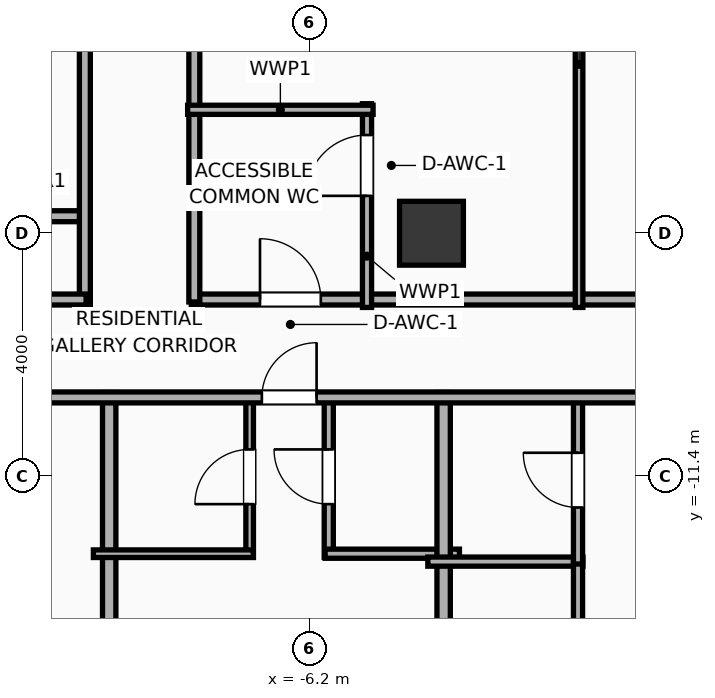
"""IFC4 building model, lengths in metres.
Left out: names, types, materials, properties, quantities, classifications, styles, units other than length and angle.
Written with IfcOpenShell. Run it as: python <this file> out.ifc"""

import sys

from ifc_helpers import new_model, si_unit, direction, frame, frame_2d, origin, origin_2d, place, context, subcontext, project, spatial, rectangle, extrude, element, fill, save


model = new_model("IFC4")
c1 = context("Model", 3, precision=1e-05, world=origin(), true_north=direction((0.0, 1.0)))
c2 = subcontext(c1, "Body", "Model", "MODEL_VIEW")
j1 = project(units=[si_unit("LENGTHUNIT", "METRE"), si_unit("PLANEANGLEUNIT", "RADIAN")], contexts=[c1])
p1 = place(None, origin())
s1 = spatial("IfcSite", under=j1, at=p1, CompositionType="ELEMENT")
p2 = place(p1, origin())
s2 = spatial("IfcBuilding", under=s1, at=p2, CompositionType="ELEMENT")
p3 = place(p2, frame((0.0, 0.0, 68.9)))
s3 = spatial("IfcBuildingStorey", under=s2, at=p3, CompositionType="ELEMENT", Elevation=68.9)
p4 = place(p3, frame((-4.2, -7.4, 0.0), z_axis=(0.0, 0.0, 1.0), x_axis=(1.0, 0.0, 0.0)))
e1 = element("IfcColumn", 1, at=p4, inside=s3, PredefinedType="COLUMN", context=c2, shape_type="SweptSolid", body=[
    extrude(rectangle(XDim=1.05, YDim=1.05, at=origin_2d()), origin(), (0.0, 0.0, 1.0), 3.9),
])
p5 = place(p3, frame((-12.15, -7.12, 0.0), z_axis=(0.0, 0.0, 1.0), x_axis=(1.0, 0.0, 0.0)))
e2 = element("IfcWall", 2, at=p5, inside=s3, PredefinedType="PARTITIONING", context=c2, shape_type="SweptSolid", body=[
    extrude(rectangle(XDim=2.27, YDim=0.18, at=frame_2d((1.135, 0.0))), origin(), (0.0, 0.0, 1.0), 2.94),
])
p6 = place(p3, frame((-9.9, -8.58, 0.0), z_axis=(0.0, 0.0, 1.0), x_axis=(0.0, 1.0, 0.0)))
e3 = element("IfcWall", 3, at=p6, inside=s3, PredefinedType="PARTITIONING", context=c2, shape_type="SweptSolid", body=[
    extrude(rectangle(XDim=17.16, YDim=0.18, at=frame_2d((8.58, 0.0))), origin(), (0.0, 0.0, 1.0), 3.65),
])
p7 = place(p6, frame((7.172, 0.0, 0.0)))
e4 = element("IfcOpeningElement", 4, at=p7, cuts=e3, PredefinedType="OPENING", context=c2, shape_type="SweptSolid", body=[
    extrude(rectangle(XDim=1.1, YDim=2.05, at=frame_2d((0.55, 1.025))), frame((0.0, 0.1, 0.0), z_axis=(0.0, -1.0, 0.0), x_axis=(1.0, 0.0, 0.0)), (0.0, 0.0, 1.0), 0.2),
])
p8 = place(p3, frame((-33.41, -8.49, 0.0), z_axis=(0.0, 0.0, 1.0), x_axis=(1.0, 0.0, 0.0)))
e5 = element("IfcWall", 5, at=p8, inside=s3, PredefinedType="PARTITIONING", context=c2, shape_type="SweptSolid", body=[
    extrude(rectangle(XDim=23.53, YDim=0.18, at=frame_2d((11.765, 0.0))), origin(), (0.0, 0.0, 1.0), 3.65),
])
p9 = place(p3, frame((-8.15, -8.49, 0.0), z_axis=(0.0, 0.0, 1.0), x_axis=(1.0, 0.0, 0.0)))
e6 = element("IfcWall", 6, at=p9, inside=s3, PredefinedType="PARTITIONING", context=c2, shape_type="SweptSolid", body=[
    extrude(rectangle(XDim=16.3, YDim=0.18, at=frame_2d((8.15, 0.0))), origin(), (0.0, 0.0, 1.0), 3.65),
])
p10 = place(p9, frame((1.13, 0.0, 0.0)))
e7 = element("IfcOpeningElement", 7, at=p10, cuts=e6, PredefinedType="OPENING", context=c2, shape_type="SweptSolid", body=[
    extrude(rectangle(XDim=1.0, YDim=2.05, at=frame_2d((0.5, 1.025))), frame((0.0, 0.1, 0.0), z_axis=(0.0, -1.0, 0.0), x_axis=(1.0, 0.0, 0.0)), (0.0, 0.0, 1.0), 0.2),
])
p11 = place(p9, frame((10.12, 0.0, 0.0)))
e8 = element("IfcOpeningElement", 8, at=p11, cuts=e6, PredefinedType="OPENING", context=c2, shape_type="SweptSolid", body=[
    extrude(rectangle(XDim=0.95, YDim=2.05, at=frame_2d((0.475, 1.025))), frame((0.0, 0.1, 0.0), z_axis=(0.0, -1.0, 0.0), x_axis=(1.0, 0.0, 0.0)), (0.0, 0.0, 1.0), 0.2),
])
p12 = place(p3, frame((-8.1, -8.53, 0.0), z_axis=(0.0, 0.0, 1.0), x_axis=(0.0, 1.0, 0.0)))
e9 = element("IfcWall", 9, at=p12, inside=s3, PredefinedType="PARTITIONING", context=c2, shape_type="SweptSolid", body=[
    extrude(rectangle(XDim=17.06, YDim=0.18, at=frame_2d((8.53, 0.0))), origin(), (0.0, 0.0, 1.0), 3.65),
])
p13 = place(p3, frame((-5.26, -8.62, 0.0), z_axis=(0.0, 0.0, 1.0), x_axis=(0.0, 1.0, 0.0)))
e10 = element("IfcWall", 10, at=p13, inside=s3, PredefinedType="PLUMBINGWALL", context=c2, shape_type="SweptSolid", body=[
    extrude(rectangle(XDim=3.35, YDim=0.15, at=frame_2d((1.675, 0.0))), origin(), (0.0, 0.0, 1.0), 3.65),
])
p14 = place(p13, frame((1.835, 0.0, 0.0)))
e11 = element("IfcOpeningElement", 11, at=p14, cuts=e10, PredefinedType="OPENING", context=c2, shape_type="SweptSolid", body=[
    extrude(rectangle(XDim=1.0, YDim=2.05, at=frame_2d((0.5, 1.025))), frame((0.0, 0.085, 0.0), z_axis=(0.0, -1.0, 0.0), x_axis=(1.0, 0.0, 0.0)), (0.0, 0.0, 1.0), 0.17),
])
p15 = place(p3, frame((-8.21, -5.37, 0.0), z_axis=(0.0, 0.0, 1.0), x_axis=(1.0, 0.0, 0.0)))
e12 = element("IfcWall", 12, at=p15, inside=s3, PredefinedType="PLUMBINGWALL", context=c2, shape_type="SweptSolid", body=[
    extrude(rectangle(XDim=3.05, YDim=0.15, at=frame_2d((1.525, 0.0))), origin(), (0.0, 0.0, 1.0), 3.65),
])
p16 = place(p3, frame((-1.773, -8.62, 0.0), z_axis=(0.0, 0.0, 1.0), x_axis=(0.0, 1.0, 0.0)))
e13 = element("IfcWall", 13, at=p16, inside=s3, PredefinedType="PARTITIONING", context=c2, shape_type="SweptSolid", body=[
    extrude(rectangle(XDim=17.24, YDim=0.125, at=frame_2d((8.62, 0.0))), origin(), (0.0, 0.0, 1.0), 3.65),
])
p17 = place(p16, frame((8.145, 0.0, 0.0)))
e14 = element("IfcOpeningElement", 14, at=p17, cuts=e13, PredefinedType="OPENING", context=c2, shape_type="SweptSolid", body=[
    extrude(rectangle(XDim=0.95, YDim=2.05, at=frame_2d((0.475, 1.025))), frame((0.0, 0.073, 0.0), z_axis=(0.0, -1.0, 0.0), x_axis=(1.0, 0.0, 0.0)), (0.0, 0.0, 1.0), 0.145),
])
p18 = place(p3, frame((-9.5, -22.21, 0.0), z_axis=(0.0, 0.0, 1.0), x_axis=(0.0, 1.0, 0.0)))
e15 = element("IfcWall", 15, at=p18, inside=s3, PredefinedType="PARTITIONING", context=c2, shape_type="SweptSolid", body=[
    extrude(rectangle(XDim=12.19, YDim=0.22, at=frame_2d((6.095, 0.0))), origin(), (0.0, 0.0, 1.0), 2.94),
])
p19 = place(p3, frame((-7.19, -12.73, 0.0), z_axis=(0.0, 0.0, 1.0), x_axis=(0.0, 1.0, 0.0)))
e16 = element("IfcWall", 16, at=p19, inside=s3, PredefinedType="PARTITIONING", context=c2, shape_type="SweptSolid", body=[
    extrude(rectangle(XDim=2.65, YDim=0.125, at=frame_2d((1.325, 0.0))), origin(), (0.0, 0.0, 1.0), 3.65),
])
p20 = place(p19, frame((0.875, 0.0, 0.0)))
e17 = element("IfcOpeningElement", 17, at=p20, cuts=e16, PredefinedType="OPENING", context=c2, shape_type="SweptSolid", body=[
    extrude(rectangle(XDim=0.9, YDim=2.05, at=frame_2d((0.45, 1.025))), frame((0.0, 0.073, 0.0), z_axis=(0.0, -1.0, 0.0), x_axis=(1.0, 0.0, 0.0)), (0.0, 0.0, 1.0), 0.145),
])
p21 = place(p3, frame((-5.889, -12.73, 0.0), z_axis=(0.0, 0.0, 1.0), x_axis=(0.0, 1.0, 0.0)))
e18 = element("IfcWall", 18, at=p21, inside=s3, PredefinedType="PLUMBINGWALL", context=c2, shape_type="SweptSolid", body=[
    extrude(rectangle(XDim=2.65, YDim=0.15, at=frame_2d((1.325, 0.0))), origin(), (0.0, 0.0, 1.0), 3.65),
])
p22 = place(p21, frame((0.875, 0.0, 0.0)))
e19 = element("IfcOpeningElement", 19, at=p22, cuts=e18, PredefinedType="OPENING", context=c2, shape_type="SweptSolid", body=[
    extrude(rectangle(XDim=0.9, YDim=2.05, at=frame_2d((0.45, 1.025))), frame((0.0, 0.085, 0.0), z_axis=(0.0, -1.0, 0.0), x_axis=(1.0, 0.0, 0.0)), (0.0, 0.0, 1.0), 0.17),
])
p23 = place(p3, frame((-9.76, -12.67, 0.0), z_axis=(0.0, 0.0, 1.0), x_axis=(1.0, 0.0, 0.0)))
e20 = element("IfcWall", 20, at=p23, inside=s3, PredefinedType="PARTITIONING", context=c2, shape_type="SweptSolid", body=[
    extrude(rectangle(XDim=2.63, YDim=0.125, at=frame_2d((1.315, 0.0))), origin(), (0.0, 0.0, 1.0), 3.65),
])
p24 = place(p3, frame((-5.949, -12.67, 0.0), z_axis=(0.0, 0.0, 1.0), x_axis=(1.0, 0.0, 0.0)))
e21 = element("IfcWall", 21, at=p24, inside=s3, PredefinedType="PLUMBINGWALL", context=c2, shape_type="SweptSolid", body=[
    extrude(rectangle(XDim=2.209, YDim=0.15, at=frame_2d((1.104, 0.0))), origin(), (0.0, 0.0, 1.0), 3.65),
])
p25 = place(p3, frame((-4.0, -22.21, 0.0), z_axis=(0.0, 0.0, 1.0), x_axis=(0.0, 1.0, 0.0)))
e22 = element("IfcWall", 22, at=p25, inside=s3, PredefinedType="PARTITIONING", context=c2, shape_type="SweptSolid", body=[
    extrude(rectangle(XDim=12.19, YDim=0.22, at=frame_2d((6.095, 0.0))), origin(), (0.0, 0.0, 1.0), 3.65),
])
p26 = place(p3, frame((-4.26, -12.8, 0.0), z_axis=(0.0, 0.0, 1.0), x_axis=(1.0, 0.0, 0.0)))
e23 = element("IfcWall", 23, at=p26, inside=s3, PredefinedType="PLUMBINGWALL", context=c2, shape_type="SweptSolid", body=[
    extrude(rectangle(XDim=2.55, YDim=0.15, at=frame_2d((1.275, 0.0))), origin(), (0.0, 0.0, 1.0), 3.65),
])
p27 = place(p3, frame((-1.79, -22.258, 0.0), z_axis=(0.0, 0.0, 1.0), x_axis=(0.0, 1.0, 0.0)))
e24 = element("IfcWall", 24, at=p27, inside=s3, PredefinedType="PLUMBINGWALL", context=c2, shape_type="SweptSolid", body=[
    extrude(rectangle(XDim=9.498, YDim=0.15, at=frame_2d((4.749, 0.0))), origin(), (0.0, 0.0, 1.0), 3.65),
])
p28 = place(p27, frame((7.338, 0.0, 0.0)))
e25 = element("IfcOpeningElement", 25, at=p28, cuts=e24, PredefinedType="OPENING", context=c2, shape_type="SweptSolid", body=[
    extrude(rectangle(XDim=0.9, YDim=2.05, at=frame_2d((0.45, 1.025))), frame((0.0, 0.085, 0.0), z_axis=(0.0, -1.0, 0.0), x_axis=(1.0, 0.0, 0.0)), (0.0, 0.0, 1.0), 0.17),
])
p29 = place(p3, frame((-1.79, -12.84, 0.0), z_axis=(0.0, 0.0, 1.0), x_axis=(0.0, 1.0, 0.0)))
e26 = element("IfcWall", 26, at=p29, inside=s3, PredefinedType="PLUMBINGWALL", context=c2, shape_type="SweptSolid", body=[
    extrude(rectangle(XDim=2.76, YDim=0.15, at=frame_2d((1.38, 0.0))), origin(), (0.0, 0.0, 1.0), 3.65),
])
p30 = place(p29, frame((0.93, 0.0, 0.0)))
e27 = element("IfcOpeningElement", 27, at=p30, cuts=e26, PredefinedType="OPENING", context=c2, shape_type="SweptSolid", body=[
    extrude(rectangle(XDim=0.9, YDim=2.05, at=frame_2d((0.45, 1.025))), frame((0.0, 0.085, 0.0), z_axis=(0.0, -1.0, 0.0), x_axis=(1.0, 0.0, 0.0)), (0.0, 0.0, 1.0), 0.17),
])
p31 = place(p3, frame((-33.41, -10.1, 0.0), z_axis=(0.0, 0.0, 1.0), x_axis=(1.0, 0.0, 0.0)))
e28 = element("IfcWall", 28, at=p31, inside=s3, PredefinedType="PARTITIONING", context=c2, shape_type="SweptSolid", body=[
    extrude(rectangle(XDim=59.62, YDim=0.18, at=frame_2d((29.81, 0.0))), origin(), (0.0, 0.0, 1.0), 3.65),
])
p32 = place(p31, frame((3.259, 0.0, 0.0)))
e29 = element("IfcOpeningElement", 29, at=p32, cuts=e28, PredefinedType="OPENING", context=c2, shape_type="SweptSolid", body=[
    extrude(rectangle(XDim=1.15, YDim=2.05, at=frame_2d((0.575, 1.025))), frame((0.0, 0.1, 0.0), z_axis=(0.0, -1.0, 0.0), x_axis=(1.0, 0.0, 0.0)), (0.0, 0.0, 1.0), 0.2),
])
p33 = place(p31, frame((10.657, 0.0, 0.0)))
e30 = element("IfcOpeningElement", 30, at=p33, cuts=e28, PredefinedType="OPENING", context=c2, shape_type="SweptSolid", body=[
    extrude(rectangle(XDim=1.15, YDim=2.05, at=frame_2d((0.575, 1.025))), frame((0.0, 0.1, 0.0), z_axis=(0.0, -1.0, 0.0), x_axis=(1.0, 0.0, 0.0)), (0.0, 0.0, 1.0), 0.2),
])
p34 = place(p31, frame((15.421, 0.0, 0.0)))
e31 = element("IfcOpeningElement", 31, at=p34, cuts=e28, PredefinedType="OPENING", context=c2, shape_type="SweptSolid", body=[
    extrude(rectangle(XDim=0.9, YDim=2.05, at=frame_2d((0.45, 1.025))), frame((0.0, 0.1, 0.0), z_axis=(0.0, -1.0, 0.0), x_axis=(1.0, 0.0, 0.0)), (0.0, 0.0, 1.0), 0.2),
])
p35 = place(p31, frame((21.657, 0.0, 0.0)))
e32 = element("IfcOpeningElement", 32, at=p35, cuts=e28, PredefinedType="OPENING", context=c2, shape_type="SweptSolid", body=[
    extrude(rectangle(XDim=1.15, YDim=2.05, at=frame_2d((0.575, 1.025))), frame((0.0, 0.1, 0.0), z_axis=(0.0, -1.0, 0.0), x_axis=(1.0, 0.0, 0.0)), (0.0, 0.0, 1.0), 0.2),
])
p36 = place(p31, frame((26.421, 0.0, 0.0)))
e33 = element("IfcOpeningElement", 33, at=p36, cuts=e28, PredefinedType="OPENING", context=c2, shape_type="SweptSolid", body=[
    extrude(rectangle(XDim=0.9, YDim=2.05, at=frame_2d((0.45, 1.025))), frame((0.0, 0.1, 0.0), z_axis=(0.0, -1.0, 0.0), x_axis=(1.0, 0.0, 0.0)), (0.0, 0.0, 1.0), 0.2),
])
p37 = place(p31, frame((32.657, 0.0, 0.0)))
e34 = element("IfcOpeningElement", 34, at=p37, cuts=e28, PredefinedType="OPENING", context=c2, shape_type="SweptSolid", body=[
    extrude(rectangle(XDim=1.15, YDim=2.05, at=frame_2d((0.575, 1.025))), frame((0.0, 0.1, 0.0), z_axis=(0.0, -1.0, 0.0), x_axis=(1.0, 0.0, 0.0)), (0.0, 0.0, 1.0), 0.2),
])
p38 = place(p31, frame((36.008, 0.0, 0.0)))
e35 = element("IfcOpeningElement", 35, at=p38, cuts=e28, PredefinedType="OPENING", context=c2, shape_type="SweptSolid", body=[
    extrude(rectangle(XDim=1.15, YDim=2.05, at=frame_2d((0.575, 1.025))), frame((0.0, 0.1, 0.0), z_axis=(0.0, -1.0, 0.0), x_axis=(1.0, 0.0, 0.0)), (0.0, 0.0, 1.0), 0.2),
])
p39 = place(p31, frame((42.917, 0.0, 0.0)))
e36 = element("IfcOpeningElement", 36, at=p39, cuts=e28, PredefinedType="OPENING", context=c2, shape_type="SweptSolid", body=[
    extrude(rectangle(XDim=0.9, YDim=2.05, at=frame_2d((0.45, 1.025))), frame((0.0, 0.1, 0.0), z_axis=(0.0, -1.0, 0.0), x_axis=(1.0, 0.0, 0.0)), (0.0, 0.0, 1.0), 0.2),
])
p40 = place(p31, frame((47.008, 0.0, 0.0)))
e37 = element("IfcOpeningElement", 37, at=p40, cuts=e28, PredefinedType="OPENING", context=c2, shape_type="SweptSolid", body=[
    extrude(rectangle(XDim=1.15, YDim=2.05, at=frame_2d((0.575, 1.025))), frame((0.0, 0.1, 0.0), z_axis=(0.0, -1.0, 0.0), x_axis=(1.0, 0.0, 0.0)), (0.0, 0.0, 1.0), 0.2),
])
p41 = place(p31, frame((55.14, 0.0, 0.0)))
e38 = element("IfcOpeningElement", 38, at=p41, cuts=e28, PredefinedType="OPENING", context=c2, shape_type="SweptSolid", body=[
    extrude(rectangle(XDim=1.15, YDim=2.05, at=frame_2d((0.575, 1.025))), frame((0.0, 0.1, 0.0), z_axis=(0.0, -1.0, 0.0), x_axis=(1.0, 0.0, 0.0)), (0.0, 0.0, 1.0), 0.2),
])
p42 = place(p10, origin())
e39 = element("IfcDoor", 39, at=p42, inside=s3, OperationType="SINGLE_SWING_LEFT", PredefinedType="DOOR", context=c2, shape_type="SweptSolid", body=[
    extrude(rectangle(XDim=1.0, YDim=2.05, at=frame_2d((0.5, 1.025))), frame((0.0, 0.025, 0.0), z_axis=(0.0, -1.0, 0.0), x_axis=(1.0, 0.0, 0.0)), (0.0, 0.0, 1.0), 0.05),
])
fill(e7, e39)
p43 = place(p14, origin())
e40 = element("IfcDoor", 40, at=p43, inside=s3, OperationType="SINGLE_SWING_LEFT", PredefinedType="DOOR", context=c2, shape_type="SweptSolid", body=[
    extrude(rectangle(XDim=1.0, YDim=2.05, at=frame_2d((0.5, 1.025))), frame((0.0, 0.025, 0.0), z_axis=(0.0, -1.0, 0.0), x_axis=(1.0, 0.0, 0.0)), (0.0, 0.0, 1.0), 0.05),
])
fill(e11, e40)
p44 = place(p20, origin())
e41 = element("IfcDoor", 41, at=p44, inside=s3, OperationType="SINGLE_SWING_LEFT", PredefinedType="DOOR", context=c2, shape_type="SweptSolid", body=[
    extrude(rectangle(XDim=0.9, YDim=2.05, at=frame_2d((0.45, 1.025))), frame((0.0, 0.025, 0.0), z_axis=(0.0, -1.0, 0.0), x_axis=(1.0, 0.0, 0.0)), (0.0, 0.0, 1.0), 0.05),
])
fill(e17, e41)
p45 = place(p22, origin())
e42 = element("IfcDoor", 42, at=p45, inside=s3, OperationType="SINGLE_SWING_RIGHT", PredefinedType="DOOR", context=c2, shape_type="SweptSolid", body=[
    extrude(rectangle(XDim=0.9, YDim=2.05, at=frame_2d((0.45, 1.025))), frame((0.0, 0.025, 0.0), z_axis=(0.0, -1.0, 0.0), x_axis=(1.0, 0.0, 0.0)), (0.0, 0.0, 1.0), 0.05),
])
fill(e19, e42)
p46 = place(p30, origin())
e43 = element("IfcDoor", 43, at=p46, inside=s3, OperationType="SINGLE_SWING_RIGHT", PredefinedType="DOOR", context=c2, shape_type="SweptSolid", body=[
    extrude(rectangle(XDim=0.9, YDim=2.05, at=frame_2d((0.45, 1.025))), frame((0.0, 0.025, 0.0), z_axis=(0.0, -1.0, 0.0), x_axis=(1.0, 0.0, 0.0)), (0.0, 0.0, 1.0), 0.05),
])
fill(e27, e43)
p47 = place(p36, origin())
e44 = element("IfcDoor", 44, at=p47, inside=s3, OperationType="SINGLE_SWING_RIGHT", PredefinedType="DOOR", context=c2, shape_type="SweptSolid", body=[
    extrude(rectangle(XDim=0.9, YDim=2.05, at=frame_2d((0.45, 1.025))), frame((0.0, 0.025, 0.0), z_axis=(0.0, -1.0, 0.0), x_axis=(1.0, 0.0, 0.0)), (0.0, 0.0, 1.0), 0.05),
])
fill(e33, e44)
save(model, sys.argv[1])
